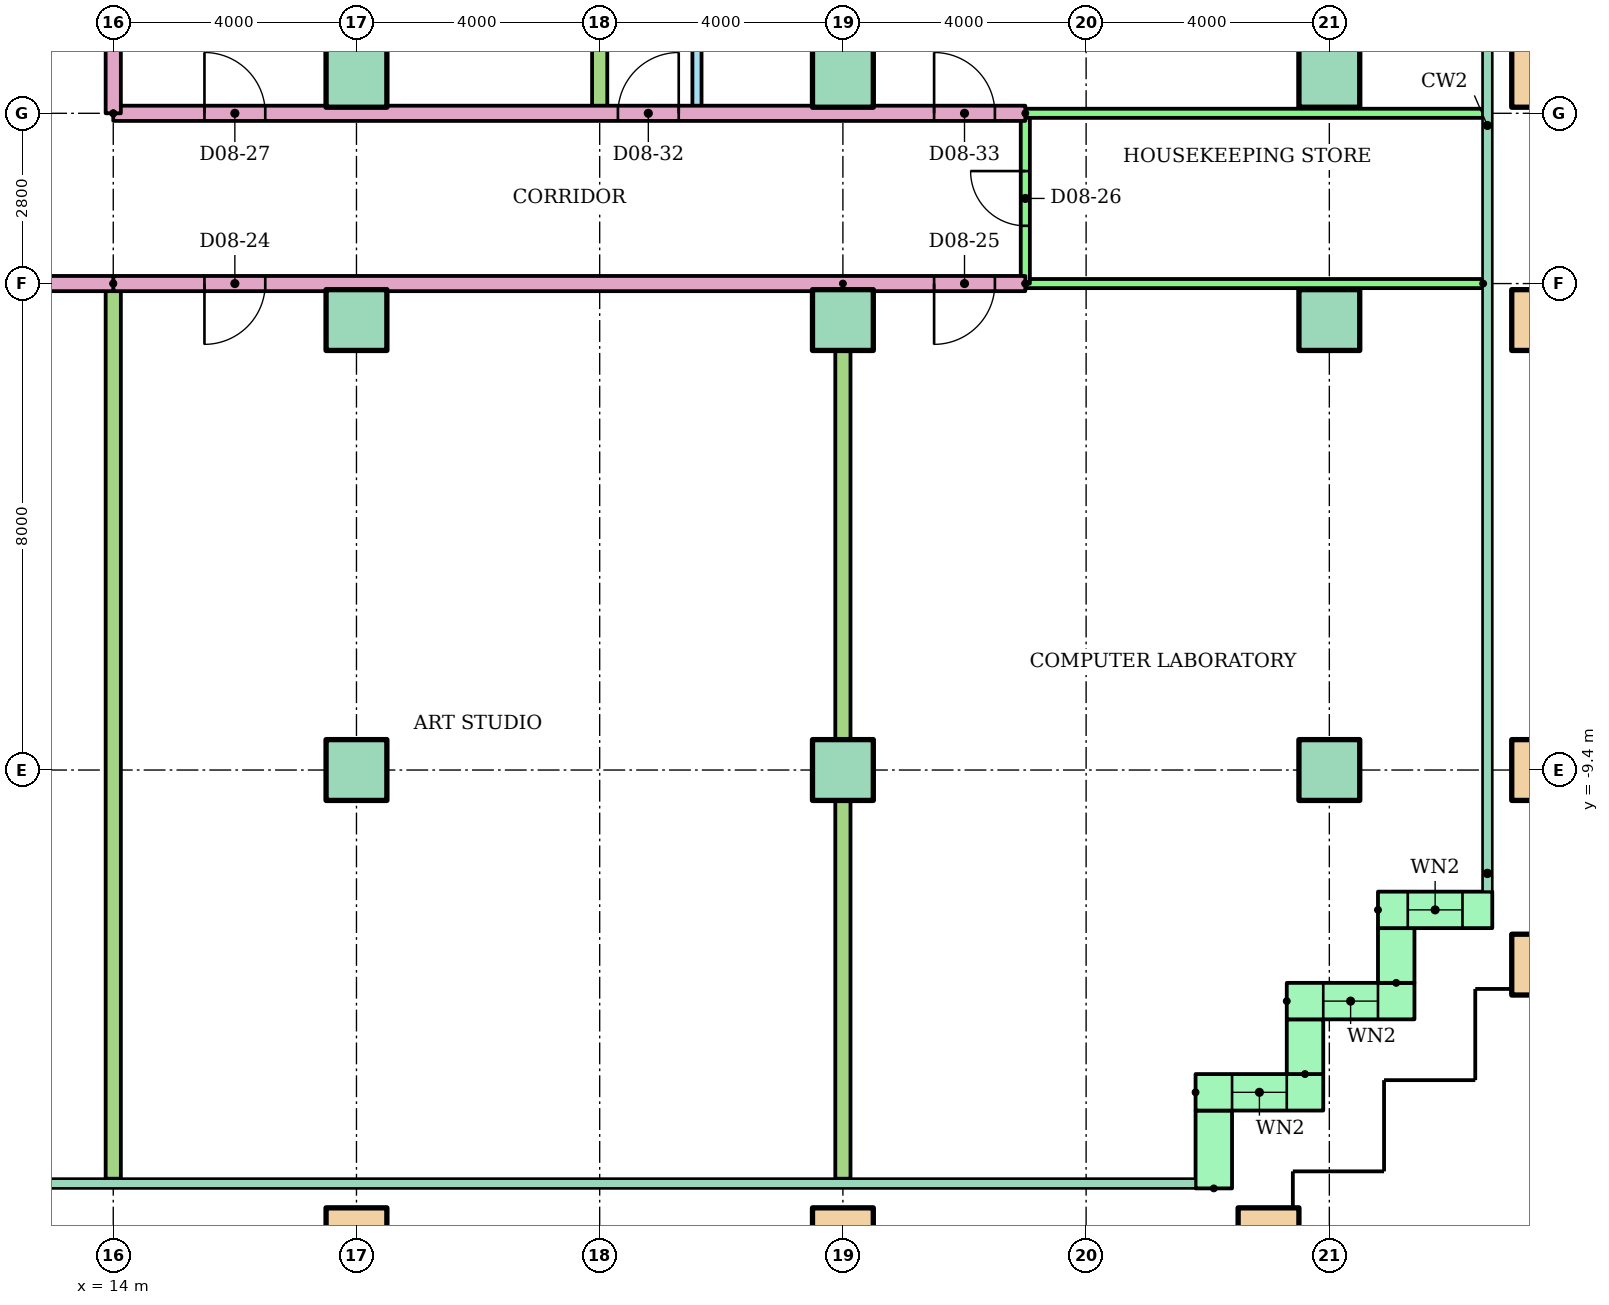
"""IFC4 building model, lengths in metres.
Left out: names, types, materials, properties, quantities, classifications, styles, units other than length and angle.
Written with IfcOpenShell. Run it as: python <this file> out.ifc"""

import sys

from ifc_helpers import new_model, si_unit, direction, frame, frame_2d, origin, origin_2d, place, context, subcontext, project, spatial, rectangle, hollow_rectangle, extrude, element, fill, save


model = new_model("IFC4")
c1 = context("Model", 3, precision=1e-05, world=origin(), true_north=direction((0.0, 1.0)))
c2 = subcontext(c1, "Body", "Model", "MODEL_VIEW")
j1 = project(units=[si_unit("LENGTHUNIT", "METRE"), si_unit("PLANEANGLEUNIT", "RADIAN")], contexts=[c1])
p1 = place(None, origin())
s1 = spatial("IfcSite", under=j1, at=p1, CompositionType="ELEMENT")
p2 = place(p1, origin())
s2 = spatial("IfcBuilding", under=s1, at=p2, CompositionType="ELEMENT")
p3 = place(p2, frame((0.0, 0.0, 33.8)))
s3 = spatial("IfcBuildingStorey", under=s2, at=p3, CompositionType="ELEMENT", Elevation=33.8)
for number, where in (
    (1, (18.0, -17.1, 0.0)),
    (2, (26.0, -17.1, 0.0)),
    (3, (33.0, -17.1, 0.0)),
    (4, (37.5, -12.6, 0.0)),
):
    element("IfcColumn", number, at=place(p3, frame(where)), inside=s3, PredefinedType="COLUMN", context=c2, shape_type="SweptSolid", body=[
        extrude(hollow_rectangle(XDim=1.0, YDim=1.0, WallThickness=0.05, at=origin_2d()), origin(), (0.0, 0.0, 1.0), 3.9),
    ])
for number, where in (
    (5, (18.0, -9.4, 0.0)),
    (6, (26.0, -9.4, 0.0)),
    (7, (34.0, -9.4, 0.0)),
):
    element("IfcColumn", number, at=place(p3, frame(where)), inside=s3, PredefinedType="COLUMN", context=c2, shape_type="SweptSolid", body=[
        extrude(rectangle(XDim=1.0, YDim=1.0, at=origin_2d()), origin(), (0.0, 0.0, 1.0), 3.9),
    ])
p4 = place(p3, frame((37.5, -9.4, 0.0)))
e8 = element("IfcColumn", 8, at=p4, inside=s3, PredefinedType="COLUMN", context=c2, shape_type="SweptSolid", body=[
    extrude(hollow_rectangle(XDim=1.0, YDim=1.0, WallThickness=0.05, at=origin_2d()), origin(), (0.0, 0.0, 1.0), 3.9),
])
for number, where in (
    (9, (18.0, -2.0, 0.0)),
    (10, (26.0, -2.0, 0.0)),
    (11, (34.0, -2.0, 0.0)),
):
    element("IfcColumn", number, at=place(p3, frame(where)), inside=s3, PredefinedType="COLUMN", context=c2, shape_type="SweptSolid", body=[
        extrude(rectangle(XDim=1.0, YDim=1.0, at=origin_2d()), origin(), (0.0, 0.0, 1.0), 3.9),
    ])
p5 = place(p3, frame((37.5, -2.0, 0.0)))
e12 = element("IfcColumn", 12, at=p5, inside=s3, PredefinedType="COLUMN", context=c2, shape_type="SweptSolid", body=[
    extrude(hollow_rectangle(XDim=1.0, YDim=1.0, WallThickness=0.05, at=origin_2d()), origin(), (0.0, 0.0, 1.0), 3.9),
])
for number, where in (
    (13, (18.0, 2.0, 0.0)),
    (14, (26.0, 2.0, 0.0)),
    (15, (34.0, 2.0, 0.0)),
):
    element("IfcColumn", number, at=place(p3, frame(where)), inside=s3, PredefinedType="COLUMN", context=c2, shape_type="SweptSolid", body=[
        extrude(rectangle(XDim=1.0, YDim=1.0, at=origin_2d()), origin(), (0.0, 0.0, 1.0), 3.9),
    ])
p6 = place(p3, frame((37.5, 2.0, 0.0)))
e16 = element("IfcColumn", 16, at=p6, inside=s3, PredefinedType="COLUMN", context=c2, shape_type="SweptSolid", body=[
    extrude(hollow_rectangle(XDim=1.0, YDim=1.0, WallThickness=0.05, at=origin_2d()), origin(), (0.0, 0.0, 1.0), 3.9),
])
p7 = place(p3, frame((32.1, -16.28, 0.0), z_axis=(0.0, 0.0, 1.0), x_axis=(0.0, 1.0, 0.0)))
e17 = element("IfcWall", 17, at=p7, inside=s3, PredefinedType="STANDARD", context=c2, shape_type="SweptSolid", body=[
    extrude(rectangle(XDim=1.28, YDim=0.6, at=frame_2d((0.64, 0.0))), origin(), (0.0, 0.0, 1.0), 3.6),
])
p8 = place(p3, frame((31.8, -14.7, 0.0)))
e18 = element("IfcWall", 18, at=p8, inside=s3, PredefinedType="STANDARD", context=c2, shape_type="SweptSolid", body=[
    extrude(rectangle(XDim=2.1, YDim=0.6, at=frame_2d((1.05, 0.0))), origin(), (0.0, 0.0, 1.0), 3.6),
])
p9 = place(p8, frame((0.6, 0.0, 0.9)))
e19 = element("IfcOpeningElement", 19, at=p9, cuts=e18, PredefinedType="OPENING", context=c2, shape_type="SweptSolid", body=[
    extrude(rectangle(XDim=0.9, YDim=1.8, at=frame_2d((0.45, 0.9))), frame((0.0, 0.31, 0.0), z_axis=(0.0, -1.0, 0.0), x_axis=(1.0, 0.0, 0.0)), (0.0, 0.0, 1.0), 0.62),
])
p10 = place(p3, frame((33.6, -14.4, 0.0), z_axis=(0.0, 0.0, 1.0), x_axis=(0.0, 1.0, 0.0)))
e20 = element("IfcWall", 20, at=p10, inside=s3, PredefinedType="STANDARD", context=c2, shape_type="SweptSolid", body=[
    extrude(rectangle(XDim=0.9, YDim=0.6, at=frame_2d((0.45, 0.0))), origin(), (0.0, 0.0, 1.0), 3.6),
])
p11 = place(p3, frame((33.3, -13.2, 0.0)))
e21 = element("IfcWall", 21, at=p11, inside=s3, PredefinedType="STANDARD", context=c2, shape_type="SweptSolid", body=[
    extrude(rectangle(XDim=2.1, YDim=0.6, at=frame_2d((1.05, 0.0))), origin(), (0.0, 0.0, 1.0), 3.6),
])
p12 = place(p11, frame((0.6, 0.0, 0.9)))
e22 = element("IfcOpeningElement", 22, at=p12, cuts=e21, PredefinedType="OPENING", context=c2, shape_type="SweptSolid", body=[
    extrude(rectangle(XDim=0.9, YDim=1.8, at=frame_2d((0.45, 0.9))), frame((0.0, 0.31, 0.0), z_axis=(0.0, -1.0, 0.0), x_axis=(1.0, 0.0, 0.0)), (0.0, 0.0, 1.0), 0.62),
])
p13 = place(p3, frame((35.1, -12.9, 0.0), z_axis=(0.0, 0.0, 1.0), x_axis=(0.0, 1.0, 0.0)))
e23 = element("IfcWall", 23, at=p13, inside=s3, PredefinedType="STANDARD", context=c2, shape_type="SweptSolid", body=[
    extrude(rectangle(XDim=0.9, YDim=0.6, at=frame_2d((0.45, 0.0))), origin(), (0.0, 0.0, 1.0), 3.6),
])
p14 = place(p3, frame((34.8, -11.7, 0.0)))
e24 = element("IfcWall", 24, at=p14, inside=s3, PredefinedType="STANDARD", context=c2, shape_type="SweptSolid", body=[
    extrude(rectangle(XDim=1.88, YDim=0.6, at=frame_2d((0.94, 0.0))), origin(), (0.0, 0.0, 1.0), 3.6),
])
p15 = place(p14, frame((0.49, 0.0, 0.9)))
e25 = element("IfcOpeningElement", 25, at=p15, cuts=e24, PredefinedType="OPENING", context=c2, shape_type="SweptSolid", body=[
    extrude(rectangle(XDim=0.9, YDim=1.8, at=frame_2d((0.45, 0.9))), frame((0.0, 0.31, 0.0), z_axis=(0.0, -1.0, 0.0), x_axis=(1.0, 0.0, 0.0)), (0.0, 0.0, 1.0), 0.62),
])
p16 = place(p3, frame((29.0, -1.4, 0.0), z_axis=(0.0, 0.0, 1.0), x_axis=(-1.0, 0.0, 0.0)))
e26 = element("IfcWall", 26, at=p16, inside=s3, PredefinedType="PARTITIONING", context=c2, shape_type="SweptSolid", body=[
    extrude(rectangle(XDim=15.0, YDim=0.25, at=frame_2d((7.5, 0.0))), origin(), (0.0, 0.0, 1.0), 3.1),
])
p17 = place(p16, frame((12.5, 0.0, 0.0)))
e27 = element("IfcOpeningElement", 27, at=p17, cuts=e26, PredefinedType="OPENING", context=c2, shape_type="SweptSolid", body=[
    extrude(rectangle(XDim=1.0, YDim=2.1, at=frame_2d((0.5, 1.05))), frame((0.0, 0.135, 0.0), z_axis=(0.0, -1.0, 0.0), x_axis=(1.0, 0.0, 0.0)), (0.0, 0.0, 1.0), 0.27),
])
p18 = place(p16, frame((0.5, 0.0, 0.0)))
e28 = element("IfcOpeningElement", 28, at=p18, cuts=e26, PredefinedType="OPENING", context=c2, shape_type="SweptSolid", body=[
    extrude(rectangle(XDim=1.0, YDim=2.1, at=frame_2d((0.5, 1.05))), frame((0.0, 0.135, 0.0), z_axis=(0.0, -1.0, 0.0), x_axis=(1.0, 0.0, 0.0)), (0.0, 0.0, 1.0), 0.27),
])
p19 = place(p3, frame((36.53, -1.4, 0.0), z_axis=(0.0, 0.0, 1.0), x_axis=(-1.0, 0.0, 0.0)))
e29 = element("IfcWall", 29, at=p19, inside=s3, PredefinedType="PARTITIONING", context=c2, shape_type="SweptSolid", body=[
    extrude(rectangle(XDim=7.53, YDim=0.15, at=frame_2d((3.765, 0.0))), origin(), (0.0, 0.0, 1.0), 3.1),
])
p20 = place(p3, frame((29.0, -1.4, 0.0), z_axis=(0.0, 0.0, 1.0), x_axis=(0.0, 1.0, 0.0)))
e30 = element("IfcWall", 30, at=p20, inside=s3, PredefinedType="PARTITIONING", context=c2, shape_type="SweptSolid", body=[
    extrude(rectangle(XDim=2.8, YDim=0.15, at=frame_2d((1.4, 0.0))), origin(), (0.0, 0.0, 1.0), 3.1),
])
p21 = place(p20, frame((0.95, 0.0, 0.0)))
e31 = element("IfcOpeningElement", 31, at=p21, cuts=e30, PredefinedType="OPENING", context=c2, shape_type="SweptSolid", body=[
    extrude(rectangle(XDim=0.9, YDim=2.1, at=frame_2d((0.45, 1.05))), frame((0.0, 0.085, 0.0), z_axis=(0.0, -1.0, 0.0), x_axis=(1.0, 0.0, 0.0)), (0.0, 0.0, 1.0), 0.17),
])
for number, where, z_axis, x_axis in (
    (32, (14.0, -1.4, 0.0), (0.0, 0.0, 1.0), (0.0, -1.0, 0.0)),
    (33, (26.0, -1.4, 0.0), (0.0, 0.0, 1.0), (0.0, -1.0, 0.0)),
):
    element("IfcWall", number, at=place(p3, frame(where, z_axis=z_axis, x_axis=x_axis)), inside=s3, PredefinedType="PARTITIONING", context=c2, shape_type="SweptSolid", body=[
        extrude(rectangle(XDim=14.721, YDim=0.25, at=frame_2d((7.361, 0.0))), origin(), (0.0, 0.0, 1.0), 3.1),
    ])
p22 = place(p3, frame((14.0, 1.4, 0.0)))
e34 = element("IfcWall", 34, at=p22, inside=s3, PredefinedType="PARTITIONING", context=c2, shape_type="SweptSolid", body=[
    extrude(rectangle(XDim=15.0, YDim=0.25, at=frame_2d((7.5, 0.0))), origin(), (0.0, 0.0, 1.0), 3.1),
])
p23 = place(p22, frame((1.5, 0.0, 0.0)))
e35 = element("IfcOpeningElement", 35, at=p23, cuts=e34, PredefinedType="OPENING", context=c2, shape_type="SweptSolid", body=[
    extrude(rectangle(XDim=1.0, YDim=2.1, at=frame_2d((0.5, 1.05))), frame((0.0, 0.135, 0.0), z_axis=(0.0, -1.0, 0.0), x_axis=(1.0, 0.0, 0.0)), (0.0, 0.0, 1.0), 0.27),
])
p24 = place(p22, frame((8.3, 0.0, 0.0)))
e36 = element("IfcOpeningElement", 36, at=p24, cuts=e34, PredefinedType="OPENING", context=c2, shape_type="SweptSolid", body=[
    extrude(rectangle(XDim=1.0, YDim=2.1, at=frame_2d((0.5, 1.05))), frame((0.0, 0.135, 0.0), z_axis=(0.0, -1.0, 0.0), x_axis=(1.0, 0.0, 0.0)), (0.0, 0.0, 1.0), 0.27),
])
p25 = place(p22, frame((13.5, 0.0, 0.0)))
e37 = element("IfcOpeningElement", 37, at=p25, cuts=e34, PredefinedType="OPENING", context=c2, shape_type="SweptSolid", body=[
    extrude(rectangle(XDim=1.0, YDim=2.1, at=frame_2d((0.5, 1.05))), frame((0.0, 0.135, 0.0), z_axis=(0.0, -1.0, 0.0), x_axis=(1.0, 0.0, 0.0)), (0.0, 0.0, 1.0), 0.27),
])
p26 = place(p3, frame((29.0, 1.4, 0.0)))
e38 = element("IfcWall", 38, at=p26, inside=s3, PredefinedType="PARTITIONING", context=c2, shape_type="SweptSolid", body=[
    extrude(rectangle(XDim=7.53, YDim=0.15, at=frame_2d((3.765, 0.0))), origin(), (0.0, 0.0, 1.0), 3.1),
])
p27 = place(p3, frame((23.6, 18.521, 0.0), z_axis=(0.0, 0.0, 1.0), x_axis=(0.0, -1.0, 0.0)))
e39 = element("IfcWall", 39, at=p27, inside=s3, PredefinedType="PARTITIONING", context=c2, shape_type="SweptSolid", body=[
    extrude(rectangle(XDim=17.121, YDim=0.15, at=frame_2d((8.561, 0.0))), origin(), (0.0, 0.0, 1.0), 3.1),
])
p28 = place(p27, frame((15.071, 0.0, 0.0)))
e40 = element("IfcOpeningElement", 40, at=p28, cuts=e39, PredefinedType="OPENING", context=c2, shape_type="SweptSolid", body=[
    extrude(rectangle(XDim=0.9, YDim=2.1, at=frame_2d((0.45, 1.05))), frame((0.0, 0.085, 0.0), z_axis=(0.0, -1.0, 0.0), x_axis=(1.0, 0.0, 0.0)), (0.0, 0.0, 1.0), 0.17),
])
p29 = place(p27, frame((10.071, 0.0, 0.0)))
e41 = element("IfcOpeningElement", 41, at=p29, cuts=e39, PredefinedType="OPENING", context=c2, shape_type="SweptSolid", body=[
    extrude(rectangle(XDim=0.9, YDim=2.1, at=frame_2d((0.45, 1.05))), frame((0.0, 0.085, 0.0), z_axis=(0.0, -1.0, 0.0), x_axis=(1.0, 0.0, 0.0)), (0.0, 0.0, 1.0), 0.17),
])
p30 = place(p27, frame((5.021, 0.0, 0.0)))
e42 = element("IfcOpeningElement", 42, at=p30, cuts=e39, PredefinedType="OPENING", context=c2, shape_type="SweptSolid", body=[
    extrude(rectangle(XDim=1.0, YDim=2.1, at=frame_2d((0.5, 1.05))), frame((0.0, 0.085, 0.0), z_axis=(0.0, -1.0, 0.0), x_axis=(1.0, 0.0, 0.0)), (0.0, 0.0, 1.0), 0.17),
])
p31 = place(p27, frame((1.471, 0.0, 0.0)))
e43 = element("IfcOpeningElement", 43, at=p31, cuts=e39, PredefinedType="OPENING", context=c2, shape_type="SweptSolid", body=[
    extrude(rectangle(XDim=0.9, YDim=2.1, at=frame_2d((0.45, 1.05))), frame((0.0, 0.085, 0.0), z_axis=(0.0, -1.0, 0.0), x_axis=(1.0, 0.0, 0.0)), (0.0, 0.0, 1.0), 0.17),
])
for number, where, z_axis, x_axis in (
    (44, (22.0, 18.521, 0.0), (0.0, 0.0, 1.0), (0.0, -1.0, 0.0)),
    (45, (26.0, 18.521, 0.0), (0.0, 0.0, 1.0), (0.0, -1.0, 0.0)),
):
    element("IfcWall", number, at=place(p3, frame(where, z_axis=z_axis, x_axis=x_axis)), inside=s3, PredefinedType="PARTITIONING", context=c2, shape_type="SweptSolid", body=[
        extrude(rectangle(XDim=17.121, YDim=0.25, at=frame_2d((8.561, 0.0))), origin(), (0.0, 0.0, 1.0), 3.1),
    ])
p32 = place(p3, frame((14.0, -1.4, 0.0), z_axis=(0.0, 0.0, 1.0), x_axis=(-1.0, 0.0, 0.0)))
e46 = element("IfcWall", 46, at=p32, inside=s3, PredefinedType="PARTITIONING", context=c2, shape_type="SweptSolid", body=[
    extrude(rectangle(XDim=28.0, YDim=0.25, at=frame_2d((14.0, 0.0))), origin(), (0.0, 0.0, 1.0), 3.1),
])
p33 = place(p32, frame((17.5, 0.0, 0.0)))
e47 = element("IfcOpeningElement", 47, at=p33, cuts=e46, PredefinedType="OPENING", context=c2, shape_type="SweptSolid", body=[
    extrude(rectangle(XDim=1.0, YDim=2.1, at=frame_2d((0.5, 1.05))), frame((0.0, 0.135, 0.0), z_axis=(0.0, -1.0, 0.0), x_axis=(1.0, 0.0, 0.0)), (0.0, 0.0, 1.0), 0.27),
])
p34 = place(p32, frame((13.5, 0.0, 0.0)))
e48 = element("IfcOpeningElement", 48, at=p34, cuts=e46, PredefinedType="OPENING", context=c2, shape_type="SweptSolid", body=[
    extrude(rectangle(XDim=1.0, YDim=2.1, at=frame_2d((0.5, 1.05))), frame((0.0, 0.135, 0.0), z_axis=(0.0, -1.0, 0.0), x_axis=(1.0, 0.0, 0.0)), (0.0, 0.0, 1.0), 0.27),
])
p35 = place(p3, frame((14.0, 1.4, 0.0), z_axis=(0.0, 0.0, 1.0), x_axis=(0.0, 1.0, 0.0)))
e49 = element("IfcWall", 49, at=p35, inside=s3, PredefinedType="PARTITIONING", context=c2, shape_type="SweptSolid", body=[
    extrude(rectangle(XDim=1.6, YDim=0.25, at=frame_2d((0.8, 0.0))), origin(), (0.0, 0.0, 1.0), 3.1),
])
p36 = place(p9, origin())
e50 = element("IfcWindow", 50, at=p36, inside=s3, PartitioningType="SINGLE_PANEL", PredefinedType="WINDOW", context=c2, shape_type="SweptSolid", body=[
    extrude(rectangle(XDim=0.9, YDim=1.8, at=frame_2d((0.45, 0.9))), frame((0.0, 0.03, 0.0), z_axis=(0.0, -1.0, 0.0), x_axis=(1.0, 0.0, 0.0)), (0.0, 0.0, 1.0), 0.06),
])
fill(e19, e50)
p37 = place(p12, origin())
e51 = element("IfcWindow", 51, at=p37, inside=s3, PartitioningType="SINGLE_PANEL", PredefinedType="WINDOW", context=c2, shape_type="SweptSolid", body=[
    extrude(rectangle(XDim=0.9, YDim=1.8, at=frame_2d((0.45, 0.9))), frame((0.0, 0.03, 0.0), z_axis=(0.0, -1.0, 0.0), x_axis=(1.0, 0.0, 0.0)), (0.0, 0.0, 1.0), 0.06),
])
fill(e22, e51)
p38 = place(p15, origin())
e52 = element("IfcWindow", 52, at=p38, inside=s3, PartitioningType="SINGLE_PANEL", PredefinedType="WINDOW", context=c2, shape_type="SweptSolid", body=[
    extrude(rectangle(XDim=0.9, YDim=1.8, at=frame_2d((0.45, 0.9))), frame((0.0, 0.03, 0.0), z_axis=(0.0, -1.0, 0.0), x_axis=(1.0, 0.0, 0.0)), (0.0, 0.0, 1.0), 0.06),
])
fill(e25, e52)
p39 = place(p17, origin())
e53 = element("IfcDoor", 53, at=p39, inside=s3, OperationType="SINGLE_SWING_RIGHT", PredefinedType="DOOR", context=c2, shape_type="SweptSolid", body=[
    extrude(rectangle(XDim=1.0, YDim=2.1, at=frame_2d((0.5, 1.05))), frame((0.0, 0.025, 0.0), z_axis=(0.0, -1.0, 0.0), x_axis=(1.0, 0.0, 0.0)), (0.0, 0.0, 1.0), 0.05),
])
fill(e27, e53)
p40 = place(p18, origin())
e54 = element("IfcDoor", 54, at=p40, inside=s3, OperationType="SINGLE_SWING_RIGHT", PredefinedType="DOOR", context=c2, shape_type="SweptSolid", body=[
    extrude(rectangle(XDim=1.0, YDim=2.1, at=frame_2d((0.5, 1.05))), frame((0.0, 0.025, 0.0), z_axis=(0.0, -1.0, 0.0), x_axis=(1.0, 0.0, 0.0)), (0.0, 0.0, 1.0), 0.05),
])
fill(e28, e54)
p41 = place(p21, origin())
e55 = element("IfcDoor", 55, at=p41, inside=s3, OperationType="SINGLE_SWING_RIGHT", PredefinedType="DOOR", context=c2, shape_type="SweptSolid", body=[
    extrude(rectangle(XDim=0.9, YDim=2.1, at=frame_2d((0.45, 1.05))), frame((0.0, 0.025, 0.0), z_axis=(0.0, -1.0, 0.0), x_axis=(1.0, 0.0, 0.0)), (0.0, 0.0, 1.0), 0.05),
])
fill(e31, e55)
p42 = place(p23, origin())
e56 = element("IfcDoor", 56, at=p42, inside=s3, OperationType="SINGLE_SWING_LEFT", PredefinedType="DOOR", context=c2, shape_type="SweptSolid", body=[
    extrude(rectangle(XDim=1.0, YDim=2.1, at=frame_2d((0.5, 1.05))), frame((0.0, 0.025, 0.0), z_axis=(0.0, -1.0, 0.0), x_axis=(1.0, 0.0, 0.0)), (0.0, 0.0, 1.0), 0.05),
])
fill(e35, e56)
p43 = place(p24, origin())
e57 = element("IfcDoor", 57, at=p43, inside=s3, OperationType="SINGLE_SWING_RIGHT", PredefinedType="DOOR", context=c2, shape_type="SweptSolid", body=[
    extrude(rectangle(XDim=1.0, YDim=2.1, at=frame_2d((0.5, 1.05))), frame((0.0, 0.025, 0.0), z_axis=(0.0, -1.0, 0.0), x_axis=(1.0, 0.0, 0.0)), (0.0, 0.0, 1.0), 0.05),
])
fill(e36, e57)
p44 = place(p25, origin())
e58 = element("IfcDoor", 58, at=p44, inside=s3, OperationType="SINGLE_SWING_LEFT", PredefinedType="DOOR", context=c2, shape_type="SweptSolid", body=[
    extrude(rectangle(XDim=1.0, YDim=2.1, at=frame_2d((0.5, 1.05))), frame((0.0, 0.025, 0.0), z_axis=(0.0, -1.0, 0.0), x_axis=(1.0, 0.0, 0.0)), (0.0, 0.0, 1.0), 0.05),
])
fill(e37, e58)
save(model, sys.argv[1])
